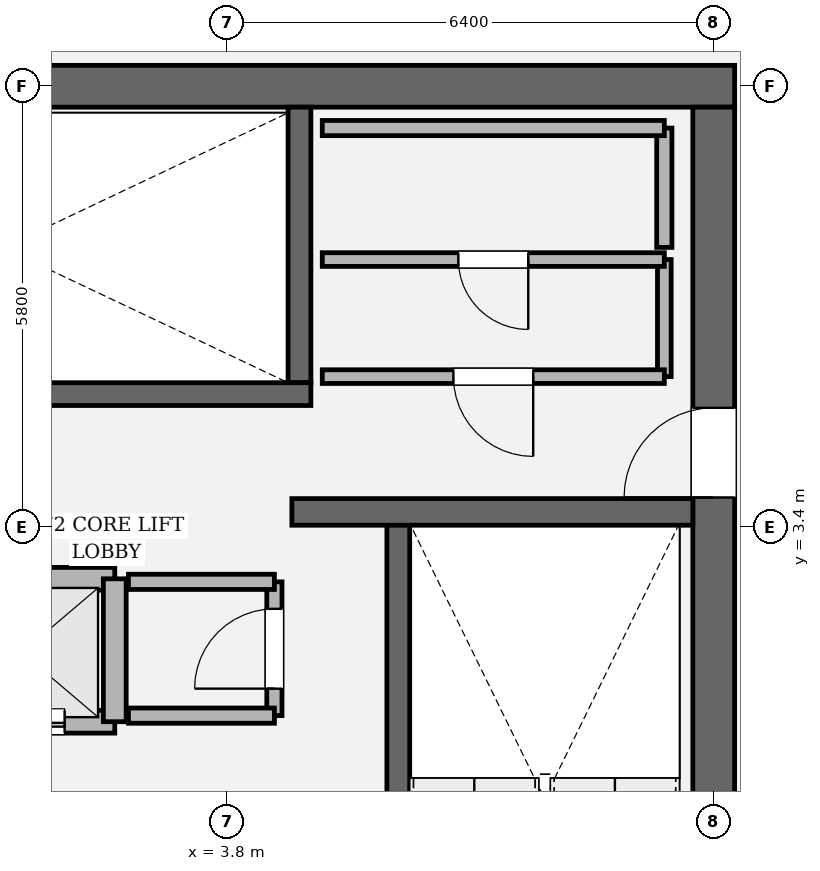
"""IFC4 building model, lengths in metres.
Left out: names, types, materials, properties, quantities, classifications, styles, units other than length and angle.
Written with IfcOpenShell. Run it as: python <this file> out.ifc"""

import sys

from ifc_helpers import new_model, si_unit, direction, frame, frame_2d, origin, place, context, subcontext, project, spatial, rectangle, extrude, element, fill, save


model = new_model("IFC4")
c1 = context("Model", 3, precision=1e-05, world=origin(), true_north=direction((0.0, 1.0)))
c2 = subcontext(c1, "Body", "Model", "MODEL_VIEW")
j1 = project(units=[si_unit("LENGTHUNIT", "METRE"), si_unit("PLANEANGLEUNIT", "RADIAN")], contexts=[c1])
p1 = place(None, origin())
s1 = spatial("IfcSite", under=j1, at=p1, CompositionType="ELEMENT")
p2 = place(p1, origin())
s2 = spatial("IfcBuilding", under=s1, at=p2, CompositionType="ELEMENT")
p3 = place(p2, frame((0.0, 0.0, 304.8)))
s3 = spatial("IfcBuildingStorey", under=s2, at=p3, CompositionType="ELEMENT", Elevation=304.8)
p4 = place(p3, frame((-10.475, 9.2, 0.0), z_axis=(0.0, 0.0, 1.0), x_axis=(1.0, 0.0, 0.0)))
e1 = element("IfcWall", 1, at=p4, inside=s3, PredefinedType="SHEAR", context=c2, shape_type="SweptSolid", body=[
    extrude(rectangle(XDim=20.95, YDim=0.55, at=frame_2d((10.475, 0.0))), origin(), (0.0, 0.0, 1.0), 4.2),
])
p5 = place(p3, frame((10.2, 8.925, 0.0), z_axis=(0.0, 0.0, 1.0), x_axis=(0.0, -1.0, 0.0)))
e2 = element("IfcWall", 2, at=p5, inside=s3, PredefinedType="SHEAR", context=c2, shape_type="SweptSolid", body=[
    extrude(rectangle(XDim=17.85, YDim=0.55, at=frame_2d((8.925, 0.0))), origin(), (0.0, 0.0, 1.0), 4.2),
])
p6 = place(p5, frame((3.955, 0.0, 0.0)))
e3 = element("IfcOpeningElement", 3, at=p6, cuts=e2, PredefinedType="OPENING", context=c2, shape_type="SweptSolid", body=[
    extrude(rectangle(XDim=1.18, YDim=2.2, at=frame_2d((0.59, 1.1))), frame((0.0, 0.285, 0.0), z_axis=(0.0, -1.0, 0.0), x_axis=(1.0, 0.0, 0.0)), (0.0, 0.0, 1.0), 0.57),
])
p7 = place(p3, frame((6.05, 3.45, 0.0), z_axis=(0.0, 0.0, 1.0), x_axis=(0.0, -1.0, 0.0)))
e4 = element("IfcWall", 4, at=p7, inside=s3, PredefinedType="SOLIDWALL", context=c2, shape_type="SweptSolid", body=[
    extrude(rectangle(XDim=8.95, YDim=0.3, at=frame_2d((4.475, 0.0))), origin(), (0.0, 0.0, 1.0), 4.2),
])
p8 = place(p3, frame((4.75, 8.925, 0.0), z_axis=(0.0, 0.0, 1.0), x_axis=(0.0, -1.0, 0.0)))
e5 = element("IfcWall", 5, at=p8, inside=s3, PredefinedType="SOLIDWALL", context=c2, shape_type="SweptSolid", body=[
    extrude(rectangle(XDim=3.625, YDim=0.3, at=frame_2d((1.812, 0.0))), origin(), (0.0, 0.0, 1.0), 4.2),
])
p9 = place(p3, frame((-4.9, 5.15, 0.0), z_axis=(0.0, 0.0, 1.0), x_axis=(1.0, 0.0, 0.0)))
e6 = element("IfcWall", 6, at=p9, inside=s3, PredefinedType="SOLIDWALL", context=c2, shape_type="SweptSolid", body=[
    extrude(rectangle(XDim=9.8, YDim=0.3, at=frame_2d((4.9, 0.0))), origin(), (0.0, 0.0, 1.0), 4.2),
])
p10 = place(p9, frame((0.56, 0.0, 0.0)))
e7 = element("IfcOpeningElement", 7, at=p10, cuts=e6, PredefinedType="OPENING", context=c2, shape_type="SweptSolid", body=[
    extrude(rectangle(XDim=1.18, YDim=2.2, at=frame_2d((0.59, 1.1))), frame((0.0, 0.16, 0.0), z_axis=(0.0, -1.0, 0.0), x_axis=(1.0, 0.0, 0.0)), (0.0, 0.0, 1.0), 0.32),
])
p11 = place(p3, frame((4.65, 3.6, 0.0), z_axis=(0.0, 0.0, 1.0), x_axis=(1.0, 0.0, 0.0)))
e8 = element("IfcWall", 8, at=p11, inside=s3, PredefinedType="SOLIDWALL", context=c2, shape_type="SweptSolid", body=[
    extrude(rectangle(XDim=5.275, YDim=0.35, at=frame_2d((2.638, 0.0))), origin(), (0.0, 0.0, 1.0), 4.2),
])
p12 = place(p3, frame((-2.32, 0.84, 0.0), z_axis=(0.0, 0.0, 1.0), x_axis=(1.0, 0.0, 0.0)))
e9 = element("IfcWall", 9, at=p12, inside=s3, PredefinedType="SOLIDWALL", context=c2, shape_type="SweptSolid", body=[
    extrude(rectangle(XDim=4.64, YDim=0.3, at=frame_2d((2.32, 0.0))), origin(), (0.0, 0.0, 1.0), 4.0),
])
p13 = place(p12, frame((0.66, 0.0, 0.0)))
e10 = element("IfcOpeningElement", 10, at=p13, cuts=e9, PredefinedType="OPENING", context=c2, shape_type="SweptSolid", body=[
    extrude(rectangle(XDim=1.12, YDim=2.25, at=frame_2d((0.56, 1.125))), frame((0.0, 0.16, 0.0), z_axis=(0.0, -1.0, 0.0), x_axis=(1.0, 0.0, 0.0)), (0.0, 0.0, 1.0), 0.32),
])
p14 = place(p12, frame((2.86, 0.0, 0.0)))
e11 = element("IfcOpeningElement", 11, at=p14, cuts=e9, PredefinedType="OPENING", context=c2, shape_type="SweptSolid", body=[
    extrude(rectangle(XDim=1.12, YDim=2.25, at=frame_2d((0.56, 1.125))), frame((0.0, 0.16, 0.0), z_axis=(0.0, -1.0, 0.0), x_axis=(1.0, 0.0, 0.0)), (0.0, 0.0, 1.0), 0.32),
])
p15 = place(p3, frame((-2.32, 2.72, 0.0), z_axis=(0.0, 0.0, 1.0), x_axis=(1.0, 0.0, 0.0)))
e12 = element("IfcWall", 12, at=p15, inside=s3, PredefinedType="SOLIDWALL", context=c2, shape_type="SweptSolid", body=[
    extrude(rectangle(XDim=4.64, YDim=0.3, at=frame_2d((2.32, 0.0))), origin(), (0.0, 0.0, 1.0), 4.0),
])
p16 = place(p3, frame((2.32, 0.84, 0.0), z_axis=(0.0, 0.0, 1.0), x_axis=(0.0, 1.0, 0.0)))
e13 = element("IfcWall", 13, at=p16, inside=s3, PredefinedType="SOLIDWALL", context=c2, shape_type="SweptSolid", body=[
    extrude(rectangle(XDim=1.88, YDim=0.3, at=frame_2d((0.94, 0.0))), origin(), (0.0, 0.0, 1.0), 4.0),
])
p17 = place(p3, frame((4.42, 0.92, 0.0), z_axis=(0.0, 0.0, 1.0), x_axis=(0.0, 1.0, 0.0)))
e14 = element("IfcWall", 14, at=p17, inside=s3, PredefinedType="SOLIDWALL", context=c2, shape_type="SweptSolid", body=[
    extrude(rectangle(XDim=1.76, YDim=0.2, at=frame_2d((0.88, 0.0))), origin(), (0.0, 0.0, 1.0), 4.0),
])
p18 = place(p17, frame((0.355, 0.0, 0.0)))
e15 = element("IfcOpeningElement", 15, at=p18, cuts=e14, PredefinedType="OPENING", context=c2, shape_type="SweptSolid", body=[
    extrude(rectangle(XDim=1.05, YDim=2.2, at=frame_2d((0.525, 1.1))), frame((0.0, 0.11, 0.0), z_axis=(0.0, -1.0, 0.0), x_axis=(1.0, 0.0, 0.0)), (0.0, 0.0, 1.0), 0.22),
])
for number, where, z_axis, x_axis in (
    (16, (4.42, 2.68, 0.0), (0.0, 0.0, 1.0), (-1.0, 0.0, 0.0)),
    (17, (2.5, 0.92, 0.0), (0.0, 0.0, 1.0), (1.0, 0.0, 0.0)),
):
    element("IfcWall", number, at=place(p3, frame(where, z_axis=z_axis, x_axis=x_axis)), inside=s3, PredefinedType="SOLIDWALL", context=c2, shape_type="SweptSolid", body=[
        extrude(rectangle(XDim=1.92, YDim=0.2, at=frame_2d((0.96, 0.0))), origin(), (0.0, 0.0, 1.0), 4.0),
    ])
p19 = place(p3, frame((9.55, 5.38, 0.0), z_axis=(0.0, 0.0, 1.0), x_axis=(0.0, 1.0, 0.0)))
e18 = element("IfcWall", 18, at=p19, inside=s3, PredefinedType="PARTITIONING", context=c2, shape_type="SweptSolid", body=[
    extrude(rectangle(XDim=1.54, YDim=0.18, at=frame_2d((0.77, 0.0))), origin(), (0.0, 0.0, 1.0), 4.0),
])
p20 = place(p3, frame((9.55, 6.92, 0.0), z_axis=(0.0, 0.0, 1.0), x_axis=(-1.0, 0.0, 0.0)))
e19 = element("IfcWall", 19, at=p20, inside=s3, PredefinedType="PARTITIONING", context=c2, shape_type="SweptSolid", body=[
    extrude(rectangle(XDim=4.5, YDim=0.18, at=frame_2d((2.25, 0.0))), origin(), (0.0, 0.0, 1.0), 4.0),
])
p21 = place(p20, frame((1.79, 0.0, 0.0)))
e20 = element("IfcOpeningElement", 20, at=p21, cuts=e19, PredefinedType="OPENING", context=c2, shape_type="SweptSolid", body=[
    extrude(rectangle(XDim=0.92, YDim=2.1, at=frame_2d((0.46, 1.05))), frame((0.0, 0.1, 0.0), z_axis=(0.0, -1.0, 0.0), x_axis=(1.0, 0.0, 0.0)), (0.0, 0.0, 1.0), 0.2),
])
p22 = place(p3, frame((5.05, 5.38, 0.0), z_axis=(0.0, 0.0, 1.0), x_axis=(1.0, 0.0, 0.0)))
e21 = element("IfcWall", 21, at=p22, inside=s3, PredefinedType="PARTITIONING", context=c2, shape_type="SweptSolid", body=[
    extrude(rectangle(XDim=4.5, YDim=0.18, at=frame_2d((2.25, 0.0))), origin(), (0.0, 0.0, 1.0), 4.0),
])
p23 = place(p22, frame((1.725, 0.0, 0.0)))
e22 = element("IfcOpeningElement", 22, at=p23, cuts=e21, PredefinedType="OPENING", context=c2, shape_type="SweptSolid", body=[
    extrude(rectangle(XDim=1.05, YDim=2.2, at=frame_2d((0.525, 1.1))), frame((0.0, 0.1, 0.0), z_axis=(0.0, -1.0, 0.0), x_axis=(1.0, 0.0, 0.0)), (0.0, 0.0, 1.0), 0.2),
])
p24 = place(p3, frame((9.55, 7.08, 0.0), z_axis=(0.0, 0.0, 1.0), x_axis=(0.0, 1.0, 0.0)))
e23 = element("IfcWall", 23, at=p24, inside=s3, PredefinedType="SOLIDWALL", context=c2, shape_type="SweptSolid", body=[
    extrude(rectangle(XDim=1.57, YDim=0.2, at=frame_2d((0.785, 0.0))), origin(), (0.0, 0.0, 1.0), 4.0),
])
p25 = place(p3, frame((9.55, 8.65, 0.0), z_axis=(0.0, 0.0, 1.0), x_axis=(-1.0, 0.0, 0.0)))
e24 = element("IfcWall", 24, at=p25, inside=s3, PredefinedType="SOLIDWALL", context=c2, shape_type="SweptSolid", body=[
    extrude(rectangle(XDim=4.5, YDim=0.2, at=frame_2d((2.25, 0.0))), origin(), (0.0, 0.0, 1.0), 4.0),
])
p26 = place(p6, origin())
e25 = element("IfcDoor", 25, at=p26, inside=s3, OperationType="SINGLE_SWING_RIGHT", PredefinedType="DOOR", context=c2, shape_type="SweptSolid", body=[
    extrude(rectangle(XDim=1.18, YDim=2.2, at=frame_2d((0.59, 1.1))), frame((0.0, 0.025, 0.0), z_axis=(0.0, -1.0, 0.0), x_axis=(1.0, 0.0, 0.0)), (0.0, 0.0, 1.0), 0.05),
])
fill(e3, e25)
p27 = place(p14, origin())
e26 = element("IfcDoor", 26, at=p27, inside=s3, OperationType="DOUBLE_DOOR_SLIDING", PredefinedType="DOOR", context=c2, shape_type="SweptSolid", body=[
    extrude(rectangle(XDim=1.12, YDim=2.25, at=frame_2d((0.56, 1.125))), frame((0.0, 0.025, 0.0), z_axis=(0.0, -1.0, 0.0), x_axis=(1.0, 0.0, 0.0)), (0.0, 0.0, 1.0), 0.05),
])
fill(e11, e26)
p28 = place(p18, origin())
e27 = element("IfcDoor", 27, at=p28, inside=s3, OperationType="SINGLE_SWING_LEFT", PredefinedType="DOOR", context=c2, shape_type="SweptSolid", body=[
    extrude(rectangle(XDim=1.05, YDim=2.2, at=frame_2d((0.525, 1.1))), frame((0.0, 0.025, 0.0), z_axis=(0.0, -1.0, 0.0), x_axis=(1.0, 0.0, 0.0)), (0.0, 0.0, 1.0), 0.05),
])
fill(e15, e27)
p29 = place(p23, origin())
e28 = element("IfcDoor", 28, at=p29, inside=s3, OperationType="SINGLE_SWING_RIGHT", PredefinedType="DOOR", context=c2, shape_type="SweptSolid", body=[
    extrude(rectangle(XDim=1.05, YDim=2.2, at=frame_2d((0.525, 1.1))), frame((0.0, 0.025, 0.0), z_axis=(0.0, -1.0, 0.0), x_axis=(1.0, 0.0, 0.0)), (0.0, 0.0, 1.0), 0.05),
])
fill(e22, e28)
p30 = place(p21, origin())
e29 = element("IfcDoor", 29, at=p30, inside=s3, OperationType="SINGLE_SWING_LEFT", PredefinedType="DOOR", context=c2, shape_type="SweptSolid", body=[
    extrude(rectangle(XDim=0.92, YDim=2.1, at=frame_2d((0.46, 1.05))), frame((0.0, 0.025, 0.0), z_axis=(0.0, -1.0, 0.0), x_axis=(1.0, 0.0, 0.0)), (0.0, 0.0, 1.0), 0.05),
])
fill(e20, e29)
save(model, sys.argv[1])
